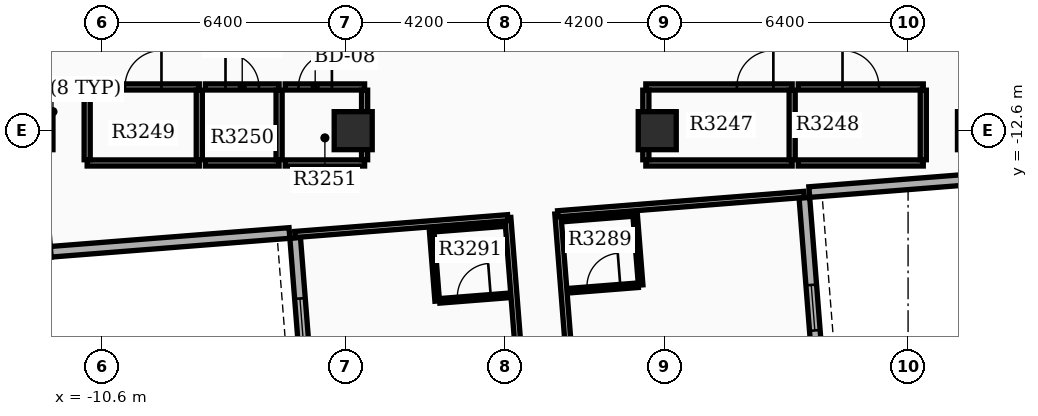
"""IFC4 building model, lengths in metres.
Left out: names, types, materials, properties, quantities, classifications, styles, units other than length and angle.
Written with IfcOpenShell. Run it as: python <this file> out.ifc"""

import sys

from ifc_helpers import new_model, si_unit, direction, frame, frame_2d, origin, origin_2d, place, context, subcontext, project, spatial, rectangle, extrude, element, fill, save


model = new_model("IFC4")
c1 = context("Model", 3, precision=1e-05, world=origin(), true_north=direction((0.0, 1.0)))
c2 = subcontext(c1, "Body", "Model", "MODEL_VIEW")
j1 = project(units=[si_unit("LENGTHUNIT", "METRE"), si_unit("PLANEANGLEUNIT", "RADIAN")], contexts=[c1])
p1 = place(None, origin())
s1 = spatial("IfcSite", under=j1, at=p1, CompositionType="ELEMENT")
p2 = place(p1, origin())
s2 = spatial("IfcBuilding", under=s1, at=p2, CompositionType="ELEMENT")
p3 = place(p2, frame((0.0, 0.0, 205.2)))
s3 = spatial("IfcBuildingStorey", under=s2, at=p3, CompositionType="ELEMENT", Elevation=205.2)
for number, where, z_axis, x_axis in (
    (1, (-12.4, -12.6, 0.0), (0.0, 0.0, 1.0), (1.0, 0.0, 0.0)),
    (2, (12.4, -12.6, 0.0), (0.0, 0.0, 1.0), (1.0, 0.0, 0.0)),
    (3, (-4.0, -12.6, 0.0), (0.0, 0.0, 1.0), (1.0, 0.0, 0.0)),
    (4, (4.0, -12.6, 0.0), (0.0, 0.0, 1.0), (1.0, 0.0, 0.0)),
):
    element("IfcColumn", number, at=place(p3, frame(where, z_axis=z_axis, x_axis=x_axis)), inside=s3, PredefinedType="COLUMN", context=c2, shape_type="SweptSolid", body=[
        extrude(rectangle(XDim=1.0, YDim=1.0, at=origin_2d()), origin(), (0.0, 0.0, 1.0), 3.9),
    ])
p4 = place(p3, frame((-5.527, -15.421, 0.0), z_axis=(0.0, 0.0, 1.0), x_axis=(0.078456642068, -0.996917526837, 0.0)))
e5 = element("IfcWall", 5, at=p4, inside=s3, PredefinedType="STANDARD", context=c2, shape_type="SweptSolid", body=[
    extrude(rectangle(XDim=14.7, YDim=0.28, at=frame_2d((7.35, 0.0))), origin(), (0.0, 0.0, 1.0), 3.18),
])
p5 = place(p4, frame((1.6, 0.0, 0.8)))
e6 = element("IfcOpeningElement", 6, at=p5, cuts=e5, PredefinedType="OPENING", context=c2, shape_type="SweptSolid", body=[
    extrude(rectangle(XDim=1.2, YDim=1.6, at=frame_2d((0.6, 0.8))), frame((0.0, 0.15, 0.0), z_axis=(0.0, -1.0, 0.0), x_axis=(1.0, 0.0, 0.0)), (0.0, 0.0, 1.0), 0.3),
])
p6 = place(p4, frame((4.8, 0.0, 0.8)))
e7 = element("IfcOpeningElement", 7, at=p6, cuts=e5, PredefinedType="OPENING", context=c2, shape_type="SweptSolid", body=[
    extrude(rectangle(XDim=1.2, YDim=1.6, at=frame_2d((0.6, 0.8))), frame((0.0, 0.15, 0.0), z_axis=(0.0, -1.0, 0.0), x_axis=(1.0, 0.0, 0.0)), (0.0, 0.0, 1.0), 0.3),
])
p7 = place(p4, frame((8.0, 0.0, 0.8)))
e8 = element("IfcOpeningElement", 8, at=p7, cuts=e5, PredefinedType="OPENING", context=c2, shape_type="SweptSolid", body=[
    extrude(rectangle(XDim=1.2, YDim=1.6, at=frame_2d((0.6, 0.8))), frame((0.0, 0.15, 0.0), z_axis=(0.0, -1.0, 0.0), x_axis=(1.0, 0.0, 0.0)), (0.0, 0.0, 1.0), 0.3),
])
p8 = place(p4, frame((11.2, 0.0, 0.8)))
e9 = element("IfcOpeningElement", 9, at=p8, cuts=e5, PredefinedType="OPENING", context=c2, shape_type="SweptSolid", body=[
    extrude(rectangle(XDim=1.2, YDim=1.6, at=frame_2d((0.6, 0.8))), frame((0.0, 0.15, 0.0), z_axis=(0.0, -1.0, 0.0), x_axis=(1.0, 0.0, 0.0)), (0.0, 0.0, 1.0), 0.3),
])
p9 = place(p3, frame((9.025, -29.021, 0.0), z_axis=(0.0, 0.0, 1.0), x_axis=(-0.078456642068, 0.996917526837, 0.0)))
e10 = element("IfcWall", 10, at=p9, inside=s3, PredefinedType="STANDARD", context=c2, shape_type="SweptSolid", body=[
    extrude(rectangle(XDim=14.7, YDim=0.28, at=frame_2d((7.35, 0.0))), origin(), (0.0, 0.0, 1.0), 3.18),
])
p10 = place(p9, frame((1.6, 0.0, 0.8)))
e11 = element("IfcOpeningElement", 11, at=p10, cuts=e10, PredefinedType="OPENING", context=c2, shape_type="SweptSolid", body=[
    extrude(rectangle(XDim=1.2, YDim=1.6, at=frame_2d((0.6, 0.8))), frame((0.0, 0.15, 0.0), z_axis=(0.0, -1.0, 0.0), x_axis=(1.0, 0.0, 0.0)), (0.0, 0.0, 1.0), 0.3),
])
p11 = place(p9, frame((4.8, 0.0, 0.8)))
e12 = element("IfcOpeningElement", 12, at=p11, cuts=e10, PredefinedType="OPENING", context=c2, shape_type="SweptSolid", body=[
    extrude(rectangle(XDim=1.2, YDim=1.6, at=frame_2d((0.6, 0.8))), frame((0.0, 0.15, 0.0), z_axis=(0.0, -1.0, 0.0), x_axis=(1.0, 0.0, 0.0)), (0.0, 0.0, 1.0), 0.3),
])
p12 = place(p9, frame((8.0, 0.0, 0.8)))
e13 = element("IfcOpeningElement", 13, at=p12, cuts=e10, PredefinedType="OPENING", context=c2, shape_type="SweptSolid", body=[
    extrude(rectangle(XDim=1.2, YDim=1.6, at=frame_2d((0.6, 0.8))), frame((0.0, 0.15, 0.0), z_axis=(0.0, -1.0, 0.0), x_axis=(1.0, 0.0, 0.0)), (0.0, 0.0, 1.0), 0.3),
])
p13 = place(p9, frame((11.2, 0.0, 0.8)))
e14 = element("IfcOpeningElement", 14, at=p13, cuts=e10, PredefinedType="OPENING", context=c2, shape_type="SweptSolid", body=[
    extrude(rectangle(XDim=1.2, YDim=1.6, at=frame_2d((0.6, 0.8))), frame((0.0, 0.15, 0.0), z_axis=(0.0, -1.0, 0.0), x_axis=(1.0, 0.0, 0.0)), (0.0, 0.0, 1.0), 0.3),
])
p14 = place(p3, frame((-11.958, -15.787, 0.0), z_axis=(0.0, 0.0, 1.0), x_axis=(0.996916125428, 0.078474447191, 0.0)))
e15 = element("IfcWall", 15, at=p14, inside=s3, PredefinedType="STANDARD", context=c2, shape_type="SweptSolid", body=[
    extrude(rectangle(XDim=6.3, YDim=0.28, at=frame_2d((3.15, 0.0))), origin(), (0.0, 0.0, 1.0), 3.18),
])
p15 = place(p3, frame((14.281, -13.722, 0.0), z_axis=(0.0, 0.0, 1.0), x_axis=(-0.99691915642, -0.078435932851, 0.0)))
e16 = element("IfcWall", 16, at=p15, inside=s3, PredefinedType="STANDARD", context=c2, shape_type="SweptSolid", body=[
    extrude(rectangle(XDim=6.3, YDim=0.28, at=frame_2d((3.15, 0.0))), origin(), (0.0, 0.0, 1.0), 3.18),
])
p16 = place(p3, frame((3.7, -13.45, 0.0), z_axis=(0.0, 0.0, 1.0), x_axis=(1.0, 0.0, 0.0)))
e17 = element("IfcWall", 17, at=p16, inside=s3, PredefinedType="PARTITIONING", context=c2, shape_type="SweptSolid", body=[
    extrude(rectangle(XDim=3.85, YDim=0.16, at=frame_2d((1.925, 0.0))), origin(), (0.0, 0.0, 1.0), 3.17),
])
p17 = place(p3, frame((3.7, -11.45, 0.0), z_axis=(0.0, 0.0, 1.0), x_axis=(1.0, 0.0, 0.0)))
e18 = element("IfcWall", 18, at=p17, inside=s3, PredefinedType="PARTITIONING", context=c2, shape_type="SweptSolid", body=[
    extrude(rectangle(XDim=3.85, YDim=0.16, at=frame_2d((1.925, 0.0))), origin(), (0.0, 0.0, 1.0), 3.17),
])
p18 = place(p17, frame((2.395, 0.0, 0.0)))
e19 = element("IfcOpeningElement", 19, at=p18, cuts=e18, PredefinedType="OPENING", context=c2, shape_type="SweptSolid", body=[
    extrude(rectangle(XDim=0.96, YDim=2.15, at=frame_2d((0.48, 1.075))), frame((0.0, 0.09, 0.0), z_axis=(0.0, -1.0, 0.0), x_axis=(1.0, 0.0, 0.0)), (0.0, 0.0, 1.0), 0.18),
])
for number, where, z_axis, x_axis in (
    (20, (3.7, -13.365, 0.0), (0.0, 0.0, 1.0), (0.0, 1.0, 0.0)),
    (21, (7.55, -13.365, 0.0), (0.0, 0.0, 1.0), (0.0, 1.0, 0.0)),
):
    element("IfcWall", number, at=place(p3, frame(where, z_axis=z_axis, x_axis=x_axis)), inside=s3, PredefinedType="PARTITIONING", context=c2, shape_type="SweptSolid", body=[
        extrude(rectangle(XDim=1.83, YDim=0.16, at=frame_2d((0.915, 0.0))), origin(), (0.0, 0.0, 1.0), 3.17),
    ])
p19 = place(p3, frame((7.71, -13.45, 0.0), z_axis=(0.0, 0.0, 1.0), x_axis=(1.0, 0.0, 0.0)))
e22 = element("IfcWall", 22, at=p19, inside=s3, PredefinedType="PARTITIONING", context=c2, shape_type="SweptSolid", body=[
    extrude(rectangle(XDim=3.29, YDim=0.16, at=frame_2d((1.645, 0.0))), origin(), (0.0, 0.0, 1.0), 3.17),
])
p20 = place(p3, frame((7.71, -11.45, 0.0), z_axis=(0.0, 0.0, 1.0), x_axis=(1.0, 0.0, 0.0)))
e23 = element("IfcWall", 23, at=p20, inside=s3, PredefinedType="PARTITIONING", context=c2, shape_type="SweptSolid", body=[
    extrude(rectangle(XDim=3.29, YDim=0.16, at=frame_2d((1.645, 0.0))), origin(), (0.0, 0.0, 1.0), 3.17),
])
p21 = place(p20, frame((1.165, 0.0, 0.0)))
e24 = element("IfcOpeningElement", 24, at=p21, cuts=e23, PredefinedType="OPENING", context=c2, shape_type="SweptSolid", body=[
    extrude(rectangle(XDim=0.96, YDim=2.15, at=frame_2d((0.48, 1.075))), frame((0.0, 0.09, 0.0), z_axis=(0.0, -1.0, 0.0), x_axis=(1.0, 0.0, 0.0)), (0.0, 0.0, 1.0), 0.18),
])
p22 = place(p3, frame((11.0, -13.365, 0.0), z_axis=(0.0, 0.0, 1.0), x_axis=(0.0, 1.0, 0.0)))
e25 = element("IfcWall", 25, at=p22, inside=s3, PredefinedType="PARTITIONING", context=c2, shape_type="SweptSolid", body=[
    extrude(rectangle(XDim=1.83, YDim=0.16, at=frame_2d((0.915, 0.0))), origin(), (0.0, 0.0, 1.0), 3.17),
])
p23 = place(p3, frame((-11.0, -13.45, 0.0), z_axis=(0.0, 0.0, 1.0), x_axis=(1.0, 0.0, 0.0)))
e26 = element("IfcWall", 26, at=p23, inside=s3, PredefinedType="PARTITIONING", context=c2, shape_type="SweptSolid", body=[
    extrude(rectangle(XDim=2.95, YDim=0.16, at=frame_2d((1.475, 0.0))), origin(), (0.0, 0.0, 1.0), 3.17),
])
p24 = place(p3, frame((-11.0, -11.45, 0.0), z_axis=(0.0, 0.0, 1.0), x_axis=(1.0, 0.0, 0.0)))
e27 = element("IfcWall", 27, at=p24, inside=s3, PredefinedType="PARTITIONING", context=c2, shape_type="SweptSolid", body=[
    extrude(rectangle(XDim=2.95, YDim=0.16, at=frame_2d((1.475, 0.0))), origin(), (0.0, 0.0, 1.0), 3.17),
])
p25 = place(p24, frame((0.995, 0.0, 0.0)))
e28 = element("IfcOpeningElement", 28, at=p25, cuts=e27, PredefinedType="OPENING", context=c2, shape_type="SweptSolid", body=[
    extrude(rectangle(XDim=0.96, YDim=2.15, at=frame_2d((0.48, 1.075))), frame((0.0, 0.09, 0.0), z_axis=(0.0, -1.0, 0.0), x_axis=(1.0, 0.0, 0.0)), (0.0, 0.0, 1.0), 0.18),
])
for number, where, z_axis, x_axis in (
    (29, (-11.0, -13.365, 0.0), (0.0, 0.0, 1.0), (0.0, 1.0, 0.0)),
    (30, (-8.05, -13.365, 0.0), (0.0, 0.0, 1.0), (0.0, 1.0, 0.0)),
):
    element("IfcWall", number, at=place(p3, frame(where, z_axis=z_axis, x_axis=x_axis)), inside=s3, PredefinedType="PARTITIONING", context=c2, shape_type="SweptSolid", body=[
        extrude(rectangle(XDim=1.83, YDim=0.16, at=frame_2d((0.915, 0.0))), origin(), (0.0, 0.0, 1.0), 3.17),
    ])
p26 = place(p3, frame((-7.89, -13.45, 0.0), z_axis=(0.0, 0.0, 1.0), x_axis=(1.0, 0.0, 0.0)))
e31 = element("IfcWall", 31, at=p26, inside=s3, PredefinedType="PARTITIONING", context=c2, shape_type="SweptSolid", body=[
    extrude(rectangle(XDim=1.94, YDim=0.16, at=frame_2d((0.97, 0.0))), origin(), (0.0, 0.0, 1.0), 3.17),
])
p27 = place(p3, frame((-7.89, -11.45, 0.0), z_axis=(0.0, 0.0, 1.0), x_axis=(1.0, 0.0, 0.0)))
e32 = element("IfcWall", 32, at=p27, inside=s3, PredefinedType="PARTITIONING", context=c2, shape_type="SweptSolid", body=[
    extrude(rectangle(XDim=1.94, YDim=0.16, at=frame_2d((0.97, 0.0))), origin(), (0.0, 0.0, 1.0), 3.17),
])
p28 = place(p27, frame((0.53, 0.0, 0.0)))
e33 = element("IfcOpeningElement", 33, at=p28, cuts=e32, PredefinedType="OPENING", context=c2, shape_type="SweptSolid", body=[
    extrude(rectangle(XDim=0.88, YDim=2.1, at=frame_2d((0.44, 1.05))), frame((0.0, 0.09, 0.0), z_axis=(0.0, -1.0, 0.0), x_axis=(1.0, 0.0, 0.0)), (0.0, 0.0, 1.0), 0.18),
])
p29 = place(p3, frame((-5.95, -13.365, 0.0), z_axis=(0.0, 0.0, 1.0), x_axis=(0.0, 1.0, 0.0)))
e34 = element("IfcWall", 34, at=p29, inside=s3, PredefinedType="PARTITIONING", context=c2, shape_type="SweptSolid", body=[
    extrude(rectangle(XDim=1.83, YDim=0.16, at=frame_2d((0.915, 0.0))), origin(), (0.0, 0.0, 1.0), 3.17),
])
p30 = place(p3, frame((-5.79, -13.45, 0.0), z_axis=(0.0, 0.0, 1.0), x_axis=(1.0, 0.0, 0.0)))
e35 = element("IfcWall", 35, at=p30, inside=s3, PredefinedType="PARTITIONING", context=c2, shape_type="SweptSolid", body=[
    extrude(rectangle(XDim=2.09, YDim=0.16, at=frame_2d((1.045, 0.0))), origin(), (0.0, 0.0, 1.0), 3.17),
])
p31 = place(p3, frame((-5.79, -11.45, 0.0), z_axis=(0.0, 0.0, 1.0), x_axis=(1.0, 0.0, 0.0)))
e36 = element("IfcWall", 36, at=p31, inside=s3, PredefinedType="PARTITIONING", context=c2, shape_type="SweptSolid", body=[
    extrude(rectangle(XDim=2.09, YDim=0.16, at=frame_2d((1.045, 0.0))), origin(), (0.0, 0.0, 1.0), 3.17),
])
p32 = place(p31, frame((0.35, 0.0, 0.0)))
e37 = element("IfcOpeningElement", 37, at=p32, cuts=e36, PredefinedType="OPENING", context=c2, shape_type="SweptSolid", body=[
    extrude(rectangle(XDim=0.88, YDim=2.15, at=frame_2d((0.44, 1.075))), frame((0.0, 0.09, 0.0), z_axis=(0.0, -1.0, 0.0), x_axis=(1.0, 0.0, 0.0)), (0.0, 0.0, 1.0), 0.18),
])
p33 = place(p3, frame((-3.7, -13.365, 0.0), z_axis=(0.0, 0.0, 1.0), x_axis=(0.0, 1.0, 0.0)))
e38 = element("IfcWall", 38, at=p33, inside=s3, PredefinedType="PARTITIONING", context=c2, shape_type="SweptSolid", body=[
    extrude(rectangle(XDim=1.83, YDim=0.16, at=frame_2d((0.915, 0.0))), origin(), (0.0, 0.0, 1.0), 3.17),
])
p34 = place(p3, frame((1.385, -14.787, 0.0), z_axis=(0.0, 0.0, 1.0), x_axis=(0.078451955012, -0.996917895694, 0.0)))
e39 = element("IfcWall", 39, at=p34, inside=s3, PredefinedType="PARTITIONING", context=c2, shape_type="SweptSolid", body=[
    extrude(rectangle(XDim=14.782, YDim=0.16, at=frame_2d((7.391, 0.0))), origin(), (0.0, 0.0, 1.0), 3.17),
])
p35 = place(p34, frame((13.53, 0.0, 0.0)))
e40 = element("IfcOpeningElement", 40, at=p35, cuts=e39, PredefinedType="OPENING", context=c2, shape_type="SweptSolid", body=[
    extrude(rectangle(XDim=0.96, YDim=2.15, at=frame_2d((0.48, 1.075))), frame((0.0, 0.09, 0.0), z_axis=(0.0, -1.0, 0.0), x_axis=(1.0, 0.0, 0.0)), (0.0, 0.0, 1.0), 0.18),
])
p36 = place(p3, frame((1.385, -14.787, 0.0), z_axis=(0.0, 0.0, 1.0), x_axis=(0.996917042006, 0.078462802379, 0.0)))
e41 = element("IfcWall", 41, at=p36, inside=s3, PredefinedType="PARTITIONING", context=c2, shape_type="SweptSolid", body=[
    extrude(rectangle(XDim=6.5, YDim=0.16, at=frame_2d((3.25, 0.0))), origin(), (0.0, 0.0, 1.0), 3.17),
])
p37 = place(p3, frame((1.684, -16.81, 0.0), z_axis=(0.0, 0.0, 1.0), x_axis=(0.996916400774, 0.0784709492, 0.0)))
e42 = element("IfcWall", 42, at=p37, inside=s3, PredefinedType="PARTITIONING", context=c2, shape_type="SweptSolid", body=[
    extrude(rectangle(XDim=1.82, YDim=0.12, at=frame_2d((0.91, 0.0))), origin(), (0.0, 0.0, 1.0), 3.17),
])
p38 = place(p37, frame((0.47, 0.0, 0.0)))
e43 = element("IfcOpeningElement", 43, at=p38, cuts=e42, PredefinedType="OPENING", context=c2, shape_type="SweptSolid", body=[
    extrude(rectangle(XDim=0.88, YDim=2.1, at=frame_2d((0.44, 1.05))), frame((0.0, 0.07, 0.0), z_axis=(0.0, -1.0, 0.0), x_axis=(1.0, 0.0, 0.0)), (0.0, 0.0, 1.0), 0.14),
])
p39 = place(p3, frame((1.537, -14.936, 0.0), z_axis=(0.0, 0.0, 1.0), x_axis=(0.996916400774, 0.0784709492, 0.0)))
e44 = element("IfcWall", 44, at=p39, inside=s3, PredefinedType="PARTITIONING", context=c2, shape_type="SweptSolid", body=[
    extrude(rectangle(XDim=1.82, YDim=0.12, at=frame_2d((0.91, 0.0))), origin(), (0.0, 0.0, 1.0), 3.17),
])
p40 = place(p3, frame((3.416, -14.788, 0.0), z_axis=(0.0, 0.0, 1.0), x_axis=(0.07843418698, -0.996919293781, 0.0)))
e45 = element("IfcWall", 45, at=p40, inside=s3, PredefinedType="PARTITIONING", context=c2, shape_type="SweptSolid", body=[
    extrude(rectangle(XDim=1.88, YDim=0.12, at=frame_2d((0.94, 0.0))), origin(), (0.0, 0.0, 1.0), 3.17),
])
p41 = place(p3, frame((0.069, -14.89, 0.0), z_axis=(0.0, 0.0, 1.0), x_axis=(0.078450663299, -0.996917997344, 0.0)))
e46 = element("IfcWall", 46, at=p41, inside=s3, PredefinedType="PARTITIONING", context=c2, shape_type="SweptSolid", body=[
    extrude(rectangle(XDim=14.782, YDim=0.16, at=frame_2d((7.391, 0.0))), origin(), (0.0, 0.0, 1.0), 3.17),
])
p42 = place(p41, frame((13.53, 0.0, 0.0)))
e47 = element("IfcOpeningElement", 47, at=p42, cuts=e46, PredefinedType="OPENING", context=c2, shape_type="SweptSolid", body=[
    extrude(rectangle(XDim=0.96, YDim=2.15, at=frame_2d((0.48, 1.075))), frame((0.0, 0.09, 0.0), z_axis=(0.0, -1.0, 0.0), x_axis=(1.0, 0.0, 0.0)), (0.0, 0.0, 1.0), 0.18),
])
p43 = place(p3, frame((0.069, -14.89, 0.0), z_axis=(0.0, 0.0, 1.0), x_axis=(-0.996914361549, -0.078496851772, 0.0)))
e48 = element("IfcWall", 48, at=p43, inside=s3, PredefinedType="PARTITIONING", context=c2, shape_type="SweptSolid", body=[
    extrude(rectangle(XDim=5.62, YDim=0.16, at=frame_2d((2.81, 0.0))), origin(), (0.0, 0.0, 1.0), 3.17),
])
p44 = place(p3, frame((-1.725, -17.078, 0.0), z_axis=(0.0, 0.0, 1.0), x_axis=(0.996926885478, 0.078337634704, 0.0)))
e49 = element("IfcWall", 49, at=p44, inside=s3, PredefinedType="PARTITIONING", context=c2, shape_type="SweptSolid", body=[
    extrude(rectangle(XDim=1.82, YDim=0.12, at=frame_2d((0.91, 0.0))), origin(), (0.0, 0.0, 1.0), 3.17),
])
p45 = place(p44, frame((0.47, 0.0, 0.0)))
e50 = element("IfcOpeningElement", 50, at=p45, cuts=e49, PredefinedType="OPENING", context=c2, shape_type="SweptSolid", body=[
    extrude(rectangle(XDim=0.88, YDim=2.1, at=frame_2d((0.44, 1.05))), frame((0.0, 0.07, 0.0), z_axis=(0.0, -1.0, 0.0), x_axis=(1.0, 0.0, 0.0)), (0.0, 0.0, 1.0), 0.14),
])
p46 = place(p3, frame((-1.873, -15.204, 0.0), z_axis=(0.0, 0.0, 1.0), x_axis=(0.996915574626, 0.078481444107, 0.0)))
e51 = element("IfcWall", 51, at=p46, inside=s3, PredefinedType="PARTITIONING", context=c2, shape_type="SweptSolid", body=[
    extrude(rectangle(XDim=1.82, YDim=0.12, at=frame_2d((0.91, 0.0))), origin(), (0.0, 0.0, 1.0), 3.17),
])
p47 = place(p3, frame((-1.938, -15.209, 0.0), z_axis=(0.0, 0.0, 1.0), x_axis=(0.078444342213, -0.99691849475, 0.0)))
e52 = element("IfcWall", 52, at=p47, inside=s3, PredefinedType="PARTITIONING", context=c2, shape_type="SweptSolid", body=[
    extrude(rectangle(XDim=1.88, YDim=0.12, at=frame_2d((0.94, 0.0))), origin(), (0.0, 0.0, 1.0), 3.17),
])
p48 = place(p5, origin())
e53 = element("IfcWindow", 53, at=p48, inside=s3, PartitioningType="SINGLE_PANEL", PredefinedType="WINDOW", context=c2, shape_type="SweptSolid", body=[
    extrude(rectangle(XDim=1.2, YDim=1.6, at=frame_2d((0.6, 0.8))), frame((0.0, 0.03, 0.0), z_axis=(0.0, -1.0, 0.0), x_axis=(1.0, 0.0, 0.0)), (0.0, 0.0, 1.0), 0.06),
])
fill(e6, e53)
p49 = place(p13, origin())
e54 = element("IfcWindow", 54, at=p49, inside=s3, PartitioningType="SINGLE_PANEL", PredefinedType="WINDOW", context=c2, shape_type="SweptSolid", body=[
    extrude(rectangle(XDim=1.2, YDim=1.6, at=frame_2d((0.6, 0.8))), frame((0.0, 0.03, 0.0), z_axis=(0.0, -1.0, 0.0), x_axis=(1.0, 0.0, 0.0)), (0.0, 0.0, 1.0), 0.06),
])
fill(e14, e54)
p50 = place(p18, origin())
e55 = element("IfcDoor", 55, at=p50, inside=s3, OperationType="SINGLE_SWING_RIGHT", PredefinedType="DOOR", context=c2, shape_type="SweptSolid", body=[
    extrude(rectangle(XDim=0.96, YDim=2.15, at=frame_2d((0.48, 1.075))), frame((0.0, 0.025, 0.0), z_axis=(0.0, -1.0, 0.0), x_axis=(1.0, 0.0, 0.0)), (0.0, 0.0, 1.0), 0.05),
])
fill(e19, e55)
p51 = place(p21, origin())
e56 = element("IfcDoor", 56, at=p51, inside=s3, OperationType="SINGLE_SWING_LEFT", PredefinedType="DOOR", context=c2, shape_type="SweptSolid", body=[
    extrude(rectangle(XDim=0.96, YDim=2.15, at=frame_2d((0.48, 1.075))), frame((0.0, 0.025, 0.0), z_axis=(0.0, -1.0, 0.0), x_axis=(1.0, 0.0, 0.0)), (0.0, 0.0, 1.0), 0.05),
])
fill(e24, e56)
p52 = place(p25, origin())
e57 = element("IfcDoor", 57, at=p52, inside=s3, OperationType="SINGLE_SWING_RIGHT", PredefinedType="DOOR", context=c2, shape_type="SweptSolid", body=[
    extrude(rectangle(XDim=0.96, YDim=2.15, at=frame_2d((0.48, 1.075))), frame((0.0, 0.025, 0.0), z_axis=(0.0, -1.0, 0.0), x_axis=(1.0, 0.0, 0.0)), (0.0, 0.0, 1.0), 0.05),
])
fill(e28, e57)
p53 = place(p28, origin())
e58 = element("IfcDoor", 58, at=p53, inside=s3, OperationType="SINGLE_SWING_LEFT", PredefinedType="DOOR", context=c2, shape_type="SweptSolid", body=[
    extrude(rectangle(XDim=0.88, YDim=2.1, at=frame_2d((0.44, 1.05))), frame((0.0, 0.025, 0.0), z_axis=(0.0, -1.0, 0.0), x_axis=(1.0, 0.0, 0.0)), (0.0, 0.0, 1.0), 0.05),
])
fill(e33, e58)
p54 = place(p32, origin())
e59 = element("IfcDoor", 59, at=p54, inside=s3, OperationType="SINGLE_SWING_RIGHT", PredefinedType="DOOR", context=c2, shape_type="SweptSolid", body=[
    extrude(rectangle(XDim=0.88, YDim=2.15, at=frame_2d((0.44, 1.075))), frame((0.0, 0.025, 0.0), z_axis=(0.0, -1.0, 0.0), x_axis=(1.0, 0.0, 0.0)), (0.0, 0.0, 1.0), 0.05),
])
fill(e37, e59)
p55 = place(p38, origin())
e60 = element("IfcDoor", 60, at=p55, inside=s3, OperationType="SINGLE_SWING_RIGHT", PredefinedType="DOOR", context=c2, shape_type="SweptSolid", body=[
    extrude(rectangle(XDim=0.88, YDim=2.1, at=frame_2d((0.44, 1.05))), frame((0.0, 0.025, 0.0), z_axis=(0.0, -1.0, 0.0), x_axis=(1.0, 0.0, 0.0)), (0.0, 0.0, 1.0), 0.05),
])
fill(e43, e60)
p56 = place(p45, origin())
e61 = element("IfcDoor", 61, at=p56, inside=s3, OperationType="SINGLE_SWING_RIGHT", PredefinedType="DOOR", context=c2, shape_type="SweptSolid", body=[
    extrude(rectangle(XDim=0.88, YDim=2.1, at=frame_2d((0.44, 1.05))), frame((0.0, 0.025, 0.0), z_axis=(0.0, -1.0, 0.0), x_axis=(1.0, 0.0, 0.0)), (0.0, 0.0, 1.0), 0.05),
])
fill(e50, e61)
save(model, sys.argv[1])
